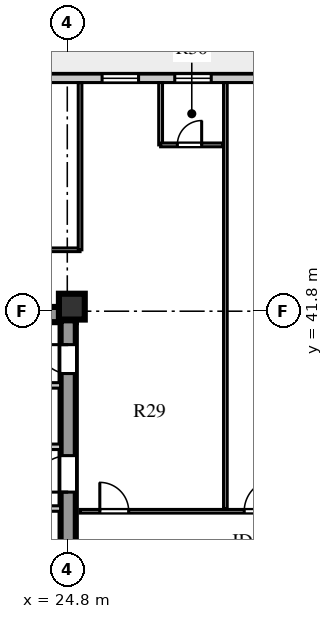
"""IFC4 building model, lengths in metres.
Left out: names, types, materials, properties, quantities, classifications, styles, units other than length and angle.
Written with IfcOpenShell. Run it as: python <this file> out.ifc"""

import sys

from ifc_helpers import new_model, si_unit, direction, frame, frame_2d, origin, origin_2d, place, context, subcontext, project, spatial, rectangle, extrude, element, fill, save


model = new_model("IFC4")
c1 = context("Model", 3, precision=1e-05, world=origin(), true_north=direction((0.0, 1.0)))
c2 = subcontext(c1, "Body", "Model", "MODEL_VIEW")
j1 = project(units=[si_unit("LENGTHUNIT", "METRE"), si_unit("PLANEANGLEUNIT", "RADIAN")], contexts=[c1])
p1 = place(None, origin())
s1 = spatial("IfcSite", under=j1, at=p1, CompositionType="ELEMENT")
p2 = place(p1, origin())
s2 = spatial("IfcBuilding", under=s1, at=p2, CompositionType="ELEMENT")
p3 = place(p2, frame((0.0, 0.0, 181.0)))
s3 = spatial("IfcBuildingStorey", under=s2, at=p3, CompositionType="ELEMENT", Elevation=181.0)
p4 = place(p3, frame((15.4, 41.69, 0.0), z_axis=(0.0, 0.0, 1.0), x_axis=(1.0, 0.0, 0.0)))
e1 = element("IfcWall", 1, at=p4, inside=s3, PredefinedType="SHEAR", context=c2, shape_type="SweptSolid", body=[
    extrude(rectangle(XDim=9.68, YDim=0.5, at=frame_2d((4.84, 0.0))), origin(), (0.0, 0.0, 1.0), 3.6),
])
p5 = place(p3, frame((24.83, 15.74, 0.0), z_axis=(0.0, 0.0, 1.0), x_axis=(0.0, 1.0, 0.0)))
e2 = element("IfcWall", 2, at=p5, inside=s3, PredefinedType="SHEAR", context=c2, shape_type="SweptSolid", body=[
    extrude(rectangle(XDim=25.76, YDim=0.5, at=frame_2d((12.88, 0.0))), origin(), (0.0, 0.0, 1.0), 3.6),
])
p6 = place(p5, frame((1.61, 0.0, 0.0)))
e3 = element("IfcOpeningElement", 3, at=p6, cuts=e2, PredefinedType="OPENING", context=c2, shape_type="SweptSolid", body=[
    extrude(rectangle(XDim=1.2, YDim=2.1, at=frame_2d((0.6, 1.05))), frame((0.0, 0.26, 0.0), z_axis=(0.0, -1.0, 0.0), x_axis=(1.0, 0.0, 0.0)), (0.0, 0.0, 1.0), 0.52),
])
p7 = place(p5, frame((6.78, 0.0, 0.0)))
e4 = element("IfcOpeningElement", 4, at=p7, cuts=e2, PredefinedType="OPENING", context=c2, shape_type="SweptSolid", body=[
    extrude(rectangle(XDim=0.85, YDim=2.06, at=frame_2d((0.425, 1.03))), frame((0.0, 0.26, 0.0), z_axis=(0.0, -1.0, 0.0), x_axis=(1.0, 0.0, 0.0)), (0.0, 0.0, 1.0), 0.52),
])
p8 = place(p5, frame((12.11, 0.0, 0.0)))
e5 = element("IfcOpeningElement", 5, at=p8, cuts=e2, PredefinedType="OPENING", context=c2, shape_type="SweptSolid", body=[
    extrude(rectangle(XDim=1.5, YDim=2.12, at=frame_2d((0.75, 1.06))), frame((0.0, 0.26, 0.0), z_axis=(0.0, -1.0, 0.0), x_axis=(1.0, 0.0, 0.0)), (0.0, 0.0, 1.0), 0.52),
])
p9 = place(p5, frame((20.11, 0.0, 0.0)))
e6 = element("IfcOpeningElement", 6, at=p9, cuts=e2, PredefinedType="OPENING", context=c2, shape_type="SweptSolid", body=[
    extrude(rectangle(XDim=1.2, YDim=2.12, at=frame_2d((0.6, 1.06))), frame((0.0, 0.26, 0.0), z_axis=(0.0, -1.0, 0.0), x_axis=(1.0, 0.0, 0.0)), (0.0, 0.0, 1.0), 0.52),
])
p10 = place(p5, frame((24.01, 0.0, 0.0)))
e7 = element("IfcOpeningElement", 7, at=p10, cuts=e2, PredefinedType="OPENING", context=c2, shape_type="SweptSolid", body=[
    extrude(rectangle(XDim=0.95, YDim=2.1, at=frame_2d((0.475, 1.05))), frame((0.0, 0.26, 0.0), z_axis=(0.0, -1.0, 0.0), x_axis=(1.0, 0.0, 0.0)), (0.0, 0.0, 1.0), 0.52),
])
p11 = place(p3, frame((24.95, 41.95, 0.0), z_axis=(0.0, 0.0, 1.0), x_axis=(1.0, 0.0, 0.0)))
e8 = element("IfcColumn", 8, at=p11, inside=s3, PredefinedType="COLUMN", context=c2, shape_type="SweptSolid", body=[
    extrude(rectangle(XDim=0.85, YDim=0.85, at=origin_2d()), origin(), (0.0, 0.0, 1.0), 3.6),
])
p12 = place(p3, frame((45.55, 49.46, 0.0), z_axis=(0.0, 0.0, 1.0), x_axis=(-1.0, 0.0, 0.0)))
e9 = element("IfcWall", 9, at=p12, inside=s3, PredefinedType="STANDARD", context=c2, shape_type="SweptSolid", body=[
    extrude(rectangle(XDim=32.5, YDim=0.28, at=frame_2d((16.25, 0.0))), origin(), (0.0, 0.0, 1.0), 3.6),
])
p13 = place(p12, frame((30.55, 0.0, 0.0)))
e10 = element("IfcOpeningElement", 10, at=p13, cuts=e9, PredefinedType="OPENING", context=c2, shape_type="SweptSolid", body=[
    extrude(rectangle(XDim=1.0, YDim=2.05, at=frame_2d((0.5, 1.025))), frame((0.0, 0.15, 0.0), z_axis=(0.0, -1.0, 0.0), x_axis=(1.0, 0.0, 0.0)), (0.0, 0.0, 1.0), 0.3),
])
p14 = place(p12, frame((24.345, 0.0, 0.8)))
e11 = element("IfcOpeningElement", 11, at=p14, cuts=e9, PredefinedType="OPENING", context=c2, shape_type="SweptSolid", body=[
    extrude(rectangle(XDim=2.25, YDim=2.0, at=frame_2d((1.125, 1.0))), frame((0.0, 0.15, 0.0), z_axis=(0.0, -1.0, 0.0), x_axis=(1.0, 0.0, 0.0)), (0.0, 0.0, 1.0), 0.3),
])
p15 = place(p12, frame((18.405, 0.0, 0.8)))
e12 = element("IfcOpeningElement", 12, at=p15, cuts=e9, PredefinedType="OPENING", context=c2, shape_type="SweptSolid", body=[
    extrude(rectangle(XDim=1.2, YDim=1.75, at=frame_2d((0.6, 0.875))), frame((0.0, 0.15, 0.0), z_axis=(0.0, -1.0, 0.0), x_axis=(1.0, 0.0, 0.0)), (0.0, 0.0, 1.0), 0.3),
])
p16 = place(p12, frame((16.015, 0.0, 0.8)))
e13 = element("IfcOpeningElement", 13, at=p16, cuts=e9, PredefinedType="OPENING", context=c2, shape_type="SweptSolid", body=[
    extrude(rectangle(XDim=1.2, YDim=1.75, at=frame_2d((0.6, 0.875))), frame((0.0, 0.15, 0.0), z_axis=(0.0, -1.0, 0.0), x_axis=(1.0, 0.0, 0.0)), (0.0, 0.0, 1.0), 0.3),
])
p17 = place(p12, frame((12.59, 0.0, 0.8)))
e14 = element("IfcOpeningElement", 14, at=p17, cuts=e9, PredefinedType="OPENING", context=c2, shape_type="SweptSolid", body=[
    extrude(rectangle(XDim=1.2, YDim=1.75, at=frame_2d((0.6, 0.875))), frame((0.0, 0.15, 0.0), z_axis=(0.0, -1.0, 0.0), x_axis=(1.0, 0.0, 0.0)), (0.0, 0.0, 1.0), 0.3),
])
p18 = place(p12, frame((6.58, 0.0, 0.8)))
e15 = element("IfcOpeningElement", 15, at=p18, cuts=e9, PredefinedType="OPENING", context=c2, shape_type="SweptSolid", body=[
    extrude(rectangle(XDim=2.4, YDim=2.05, at=frame_2d((1.2, 1.025))), frame((0.0, 0.15, 0.0), z_axis=(0.0, -1.0, 0.0), x_axis=(1.0, 0.0, 0.0)), (0.0, 0.0, 1.0), 0.3),
])
p19 = place(p12, frame((1.37, 0.0, 0.8)))
e16 = element("IfcOpeningElement", 16, at=p19, cuts=e9, PredefinedType="OPENING", context=c2, shape_type="SweptSolid", body=[
    extrude(rectangle(XDim=2.1, YDim=1.95, at=frame_2d((1.05, 0.975))), frame((0.0, 0.15, 0.0), z_axis=(0.0, -1.0, 0.0), x_axis=(1.0, 0.0, 0.0)), (0.0, 0.0, 1.0), 0.3),
])
p20 = place(p3, frame((22.02, 35.31, 0.0), z_axis=(0.0, 0.0, 1.0), x_axis=(1.0, 0.0, 0.0)))
e17 = element("IfcWall", 17, at=p20, inside=s3, PredefinedType="SOLIDWALL", context=c2, shape_type="SweptSolid", body=[
    extrude(rectangle(XDim=2.56, YDim=0.18, at=frame_2d((1.28, 0.0))), origin(), (0.0, 0.0, 1.0), 3.6),
])
p21 = place(p20, frame((0.55, 0.0, 0.0)))
e18 = element("IfcOpeningElement", 18, at=p21, cuts=e17, PredefinedType="OPENING", context=c2, shape_type="SweptSolid", body=[
    extrude(rectangle(XDim=1.0, YDim=2.1, at=frame_2d((0.5, 1.05))), frame((0.0, 0.1, 0.0), z_axis=(0.0, -1.0, 0.0), x_axis=(1.0, 0.0, 0.0)), (0.0, 0.0, 1.0), 0.2),
])
p22 = place(p3, frame((19.64, 37.34, 0.0), z_axis=(0.0, 0.0, 1.0), x_axis=(1.0, 0.0, 0.0)))
e19 = element("IfcWall", 19, at=p22, inside=s3, PredefinedType="SOLIDWALL", context=c2, shape_type="SweptSolid", body=[
    extrude(rectangle(XDim=4.94, YDim=0.18, at=frame_2d((2.47, 0.0))), origin(), (0.0, 0.0, 1.0), 3.6),
])
p23 = place(p22, frame((0.45, 0.0, 0.0)))
e20 = element("IfcOpeningElement", 20, at=p23, cuts=e19, PredefinedType="OPENING", context=c2, shape_type="SweptSolid", body=[
    extrude(rectangle(XDim=1.0, YDim=2.1, at=frame_2d((0.5, 1.05))), frame((0.0, 0.1, 0.0), z_axis=(0.0, -1.0, 0.0), x_axis=(1.0, 0.0, 0.0)), (0.0, 0.0, 1.0), 0.2),
])
p24 = place(p22, frame((2.5, 0.0, 0.0)))
e21 = element("IfcOpeningElement", 21, at=p24, cuts=e19, PredefinedType="OPENING", context=c2, shape_type="SweptSolid", body=[
    extrude(rectangle(XDim=1.0, YDim=2.1, at=frame_2d((0.5, 1.05))), frame((0.0, 0.1, 0.0), z_axis=(0.0, -1.0, 0.0), x_axis=(1.0, 0.0, 0.0)), (0.0, 0.0, 1.0), 0.2),
])
p25 = place(p3, frame((19.64, 39.36, 0.0), z_axis=(0.0, 0.0, 1.0), x_axis=(1.0, 0.0, 0.0)))
e22 = element("IfcWall", 22, at=p25, inside=s3, PredefinedType="SOLIDWALL", context=c2, shape_type="SweptSolid", body=[
    extrude(rectangle(XDim=4.94, YDim=0.18, at=frame_2d((2.47, 0.0))), origin(), (0.0, 0.0, 1.0), 3.6),
])
p26 = place(p3, frame((25.22, 35.22, 0.0), z_axis=(0.0, 0.0, 1.0), x_axis=(1.0, 0.0, 0.0)))
e23 = element("IfcWall", 23, at=p26, inside=s3, PredefinedType="PARTITIONING", context=c2, shape_type="SweptSolid", body=[
    extrude(rectangle(XDim=9.5, YDim=0.12, at=frame_2d((4.75, 0.0))), origin(), (0.0, 0.0, 1.0), 3.6),
])
p27 = place(p26, frame((0.65, 0.0, 0.0)))
e24 = element("IfcOpeningElement", 24, at=p27, cuts=e23, PredefinedType="OPENING", context=c2, shape_type="SweptSolid", body=[
    extrude(rectangle(XDim=0.95, YDim=2.1, at=frame_2d((0.475, 1.05))), frame((0.0, 0.07, 0.0), z_axis=(0.0, -1.0, 0.0), x_axis=(1.0, 0.0, 0.0)), (0.0, 0.0, 1.0), 0.14),
])
p28 = place(p26, frame((5.4, 0.0, 0.0)))
e25 = element("IfcOpeningElement", 25, at=p28, cuts=e23, PredefinedType="OPENING", context=c2, shape_type="SweptSolid", body=[
    extrude(rectangle(XDim=1.05, YDim=2.1, at=frame_2d((0.525, 1.05))), frame((0.0, 0.07, 0.0), z_axis=(0.0, -1.0, 0.0), x_axis=(1.0, 0.0, 0.0)), (0.0, 0.0, 1.0), 0.14),
])
p29 = place(p3, frame((13.39, 43.82, 0.0), z_axis=(0.0, 0.0, 1.0), x_axis=(1.0, 0.0, 0.0)))
e26 = element("IfcWall", 26, at=p29, inside=s3, PredefinedType="PARTITIONING", context=c2, shape_type="SweptSolid", body=[
    extrude(rectangle(XDim=11.83, YDim=0.12, at=frame_2d((5.915, 0.0))), origin(), (0.0, 0.0, 1.0), 3.6),
])
p30 = place(p29, frame((4.76, 0.0, 0.0)))
e27 = element("IfcOpeningElement", 27, at=p30, cuts=e26, PredefinedType="OPENING", context=c2, shape_type="SweptSolid", body=[
    extrude(rectangle(XDim=1.0, YDim=2.08, at=frame_2d((0.5, 1.04))), frame((0.0, 0.07, 0.0), z_axis=(0.0, -1.0, 0.0), x_axis=(1.0, 0.0, 0.0)), (0.0, 0.0, 1.0), 0.14),
])
p31 = place(p3, frame((25.22, 43.82, 0.0), z_axis=(0.0, 0.0, 1.0), x_axis=(0.0, 1.0, 0.0)))
e28 = element("IfcWall", 28, at=p31, inside=s3, PredefinedType="PARTITIONING", context=c2, shape_type="SweptSolid", body=[
    extrude(rectangle(XDim=5.5, YDim=0.12, at=frame_2d((2.75, 0.0))), origin(), (0.0, 0.0, 1.0), 3.15),
])
p32 = place(p3, frame((30.0, 35.3, 0.0), z_axis=(0.0, 0.0, 1.0), x_axis=(0.0, 1.0, 0.0)))
e29 = element("IfcWall", 29, at=p32, inside=s3, PredefinedType="PARTITIONING", context=c2, shape_type="SweptSolid", body=[
    extrude(rectangle(XDim=14.02, YDim=0.12, at=frame_2d((7.01, 0.0))), origin(), (0.0, 0.0, 1.0), 3.6),
])
p33 = place(p3, frame((27.87, 47.27, 0.0), z_axis=(0.0, 0.0, 1.0), x_axis=(0.0, 1.0, 0.0)))
e30 = element("IfcWall", 30, at=p33, inside=s3, PredefinedType="PLUMBINGWALL", context=c2, shape_type="SweptSolid", body=[
    extrude(rectangle(XDim=2.05, YDim=0.125, at=frame_2d((1.025, 0.0))), origin(), (0.0, 0.0, 1.0), 3.6),
])
p34 = place(p3, frame((27.87, 47.27, 0.0), z_axis=(0.0, 0.0, 1.0), x_axis=(1.0, 0.0, 0.0)))
e31 = element("IfcWall", 31, at=p34, inside=s3, PredefinedType="PLUMBINGWALL", context=c2, shape_type="SweptSolid", body=[
    extrude(rectangle(XDim=2.05, YDim=0.125, at=frame_2d((1.025, 0.0))), origin(), (0.0, 0.0, 1.0), 3.6),
])
p35 = place(p34, frame((0.55, 0.0, 0.0)))
e32 = element("IfcOpeningElement", 32, at=p35, cuts=e31, PredefinedType="OPENING", context=c2, shape_type="SweptSolid", body=[
    extrude(rectangle(XDim=0.8, YDim=2.05, at=frame_2d((0.4, 1.025))), frame((0.0, 0.073, 0.0), z_axis=(0.0, -1.0, 0.0), x_axis=(1.0, 0.0, 0.0)), (0.0, 0.0, 1.0), 0.145),
])
p36 = place(p15, origin())
e33 = element("IfcWindow", 33, at=p36, inside=s3, PartitioningType="SINGLE_PANEL", PredefinedType="WINDOW", context=c2, shape_type="SweptSolid", body=[
    extrude(rectangle(XDim=1.2, YDim=1.75, at=frame_2d((0.6, 0.875))), frame((0.0, 0.03, 0.0), z_axis=(0.0, -1.0, 0.0), x_axis=(1.0, 0.0, 0.0)), (0.0, 0.0, 1.0), 0.06),
])
fill(e12, e33)
p37 = place(p16, origin())
e34 = element("IfcWindow", 34, at=p37, inside=s3, PartitioningType="SINGLE_PANEL", PredefinedType="WINDOW", context=c2, shape_type="SweptSolid", body=[
    extrude(rectangle(XDim=1.2, YDim=1.75, at=frame_2d((0.6, 0.875))), frame((0.0, 0.03, 0.0), z_axis=(0.0, -1.0, 0.0), x_axis=(1.0, 0.0, 0.0)), (0.0, 0.0, 1.0), 0.06),
])
fill(e13, e34)
p38 = place(p9, frame((1.2, 0.0, 0.0), z_axis=(0.0, 0.0, 1.0), x_axis=(-1.0, 0.0, 0.0)))
e35 = element("IfcDoor", 35, at=p38, inside=s3, OperationType="SINGLE_SWING_RIGHT", PredefinedType="DOOR", context=c2, shape_type="SweptSolid", body=[
    extrude(rectangle(XDim=1.2, YDim=2.12, at=frame_2d((0.6, 1.06))), frame((0.0, 0.025, 0.0), z_axis=(0.0, -1.0, 0.0), x_axis=(1.0, 0.0, 0.0)), (0.0, 0.0, 1.0), 0.05),
])
fill(e6, e35)
p39 = place(p10, frame((0.95, 0.0, 0.0), z_axis=(0.0, 0.0, 1.0), x_axis=(-1.0, 0.0, 0.0)))
e36 = element("IfcDoor", 36, at=p39, inside=s3, OperationType="SINGLE_SWING_LEFT", PredefinedType="DOOR", context=c2, shape_type="SweptSolid", body=[
    extrude(rectangle(XDim=0.95, YDim=2.1, at=frame_2d((0.475, 1.05))), frame((0.0, 0.025, 0.0), z_axis=(0.0, -1.0, 0.0), x_axis=(1.0, 0.0, 0.0)), (0.0, 0.0, 1.0), 0.05),
])
fill(e7, e36)
p40 = place(p27, origin())
e37 = element("IfcDoor", 37, at=p40, inside=s3, OperationType="SINGLE_SWING_LEFT", PredefinedType="DOOR", context=c2, shape_type="SweptSolid", body=[
    extrude(rectangle(XDim=0.95, YDim=2.1, at=frame_2d((0.475, 1.05))), frame((0.0, 0.025, 0.0), z_axis=(0.0, -1.0, 0.0), x_axis=(1.0, 0.0, 0.0)), (0.0, 0.0, 1.0), 0.05),
])
fill(e24, e37)
p41 = place(p35, frame((0.8, 0.0, 0.0), z_axis=(0.0, 0.0, 1.0), x_axis=(-1.0, 0.0, 0.0)))
e38 = element("IfcDoor", 38, at=p41, inside=s3, OperationType="SINGLE_SWING_LEFT", PredefinedType="DOOR", context=c2, shape_type="SweptSolid", body=[
    extrude(rectangle(XDim=0.8, YDim=2.05, at=frame_2d((0.4, 1.025))), frame((0.0, 0.025, 0.0), z_axis=(0.0, -1.0, 0.0), x_axis=(1.0, 0.0, 0.0)), (0.0, 0.0, 1.0), 0.05),
])
fill(e32, e38)
p42 = place(p28, origin())
e39 = element("IfcDoor", 39, at=p42, inside=s3, OperationType="SINGLE_SWING_RIGHT", PredefinedType="DOOR", context=c2, shape_type="SweptSolid", body=[
    extrude(rectangle(XDim=1.05, YDim=2.1, at=frame_2d((0.525, 1.05))), frame((0.0, 0.025, 0.0), z_axis=(0.0, -1.0, 0.0), x_axis=(1.0, 0.0, 0.0)), (0.0, 0.0, 1.0), 0.05),
])
fill(e25, e39)
save(model, sys.argv[1])
